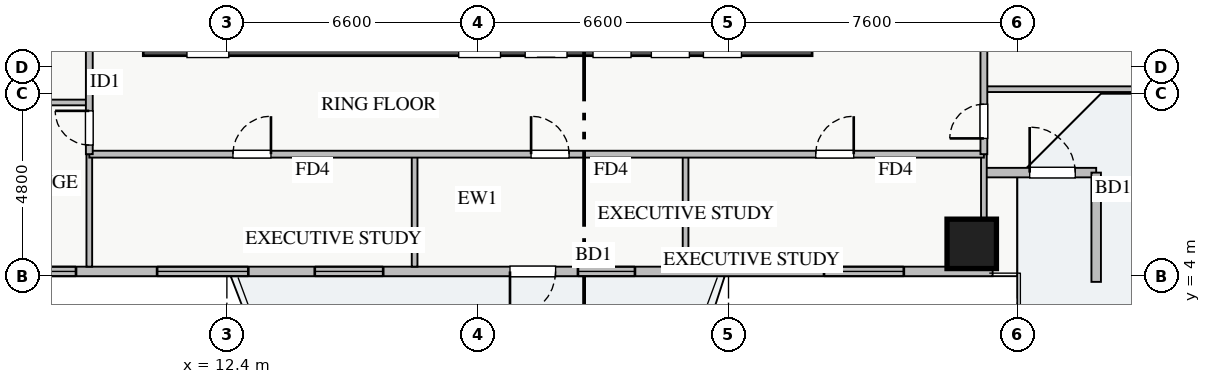
"""IFC4 building model, lengths in metres.
Left out: names, types, materials, properties, quantities, classifications, styles, units other than length and angle.
Written with IfcOpenShell. Run it as: python <this file> out.ifc"""

import sys

from ifc_helpers import new_model, si_unit, direction, frame, frame_2d, origin, origin_2d, place, context, subcontext, project, spatial, rectangle, extrude, source, transform, mapped, element, fill, save


model = new_model("IFC4")
c1 = context("Model", 3, precision=1e-05, world=origin(), true_north=direction((0.0, 1.0)))
c2 = subcontext(c1, "Body", "Model", "MODEL_VIEW")
j1 = project(units=[si_unit("LENGTHUNIT", "METRE"), si_unit("PLANEANGLEUNIT", "RADIAN")], contexts=[c1])
p1 = place(None, origin())
s1 = spatial("IfcSite", under=j1, at=p1, CompositionType="ELEMENT")
p2 = place(p1, origin())
s2 = spatial("IfcBuilding", under=s1, at=p2, CompositionType="ELEMENT")
p3 = place(p2, frame((0.0, 0.0, 23.0)))
s3 = spatial("IfcBuildingStorey", under=s2, at=p3, CompositionType="ELEMENT", Elevation=23.0)
p4 = place(p3, frame((10.2, 10.2, 0.0), z_axis=(0.0, 0.0, 1.0), x_axis=(1.0, 0.0, 0.0)))
e1 = element("IfcWall", 1, at=p4, inside=s3, PredefinedType="SHEAR", context=c2, shape_type="SweptSolid", body=[
    extrude(rectangle(XDim=17.6, YDim=0.8, at=frame_2d((8.8, 0.0))), origin(), (0.0, 0.0, 1.0), 3.25),
])
p5 = place(p4, frame((1.15, 0.0, 0.0)))
e2 = element("IfcOpeningElement", 2, at=p5, cuts=e1, PredefinedType="OPENING", context=c2, shape_type="SweptSolid", body=[
    extrude(rectangle(XDim=1.1, YDim=2.05, at=frame_2d((0.55, 1.025))), frame((0.0, 0.41, 0.0), z_axis=(0.0, -1.0, 0.0), x_axis=(1.0, 0.0, 0.0)), (0.0, 0.0, 1.0), 0.82),
])
p6 = place(p4, frame((8.3, 0.0, 0.0)))
e3 = element("IfcOpeningElement", 3, at=p6, cuts=e1, PredefinedType="OPENING", context=c2, shape_type="SweptSolid", body=[
    extrude(rectangle(XDim=1.1, YDim=2.05, at=frame_2d((0.55, 1.025))), frame((0.0, 0.41, 0.0), z_axis=(0.0, -1.0, 0.0), x_axis=(1.0, 0.0, 0.0)), (0.0, 0.0, 1.0), 0.82),
])
p7 = place(p4, frame((10.05, 0.0, 0.0)))
e4 = element("IfcOpeningElement", 4, at=p7, cuts=e1, PredefinedType="OPENING", context=c2, shape_type="SweptSolid", body=[
    extrude(rectangle(XDim=1.1, YDim=2.05, at=frame_2d((0.55, 1.025))), frame((0.0, 0.41, 0.0), z_axis=(0.0, -1.0, 0.0), x_axis=(1.0, 0.0, 0.0)), (0.0, 0.0, 1.0), 0.82),
])
p8 = place(p4, frame((14.74, 0.0, 0.0)))
e5 = element("IfcOpeningElement", 5, at=p8, cuts=e1, PredefinedType="OPENING", context=c2, shape_type="SweptSolid", body=[
    extrude(rectangle(XDim=1.0, YDim=2.05, at=frame_2d((0.5, 1.025))), frame((0.0, 0.41, 0.0), z_axis=(0.0, -1.0, 0.0), x_axis=(1.0, 0.0, 0.0)), (0.0, 0.0, 1.0), 0.82),
])
p9 = place(p4, frame((11.835, 0.0, 0.0)))
e6 = element("IfcOpeningElement", 6, at=p9, cuts=e1, PredefinedType="OPENING", context=c2, shape_type="SweptSolid", body=[
    extrude(rectangle(XDim=1.0, YDim=2.05, at=frame_2d((0.5, 1.025))), frame((0.0, 0.41, 0.0), z_axis=(0.0, -1.0, 0.0), x_axis=(1.0, 0.0, 0.0)), (0.0, 0.0, 1.0), 0.82),
])
p10 = place(p4, frame((13.37, 0.0, 0.0)))
e7 = element("IfcOpeningElement", 7, at=p10, cuts=e1, PredefinedType="OPENING", context=c2, shape_type="SweptSolid", body=[
    extrude(rectangle(XDim=1.0, YDim=2.05, at=frame_2d((0.5, 1.025))), frame((0.0, 0.41, 0.0), z_axis=(0.0, -1.0, 0.0), x_axis=(1.0, 0.0, 0.0)), (0.0, 0.0, 1.0), 0.82),
])
m1 = source(origin(), c2, "Body", "SweptSolid", [
    extrude(rectangle(XDim=1.3, YDim=1.3, at=origin_2d()), origin(), (0.0, 0.0, 1.0), 3.25),
])
p11 = place(p3, frame((32.0, 4.85, 0.0), z_axis=(0.0, 0.0, 1.0), x_axis=(1.0, 0.0, 0.0)))
e8 = element("IfcColumn", 8, at=p11, inside=s3, PredefinedType="COLUMN", context=c2, shape_type="MappedRepresentation", body=[
    mapped(m1, transform((0.0, 0.0, 0.0), x_axis=(1.0, 0.0, 0.0), y_axis=(0.0, 1.0, 0.0), z_axis=(0.0, 0.0, 1.0), scale=1.0)),
])
p12 = place(p3, frame((5.45, 4.125, 0.0), z_axis=(0.0, 0.0, 1.0), x_axis=(1.0, 0.0, 0.0)))
e9 = element("IfcWall", 9, at=p12, inside=s3, PredefinedType="STANDARD", context=c2, shape_type="SweptSolid", body=[
    extrude(rectangle(XDim=27.1, YDim=0.25, at=frame_2d((13.55, 0.0))), origin(), (0.0, 0.0, 1.0), 2.61),
])
p13 = place(p12, frame((14.4, 0.0, 0.0)))
e10 = element("IfcOpeningElement", 10, at=p13, cuts=e9, PredefinedType="OPENING", context=c2, shape_type="SweptSolid", body=[
    extrude(rectangle(XDim=1.2, YDim=2.1, at=frame_2d((0.6, 1.05))), frame((0.0, 0.135, 0.0), z_axis=(0.0, -1.0, 0.0), x_axis=(1.0, 0.0, 0.0)), (0.0, 0.0, 1.0), 0.27),
])
p14 = place(p12, frame((1.48, 0.0, 0.9)))
e11 = element("IfcOpeningElement", 11, at=p14, cuts=e9, PredefinedType="OPENING", context=c2, shape_type="SweptSolid", body=[
    extrude(rectangle(XDim=1.5, YDim=1.5, at=frame_2d((0.75, 0.75))), frame((0.0, 0.135, 0.0), z_axis=(0.0, -1.0, 0.0), x_axis=(1.0, 0.0, 0.0)), (0.0, 0.0, 1.0), 0.27),
])
p15 = place(p12, frame((9.263, 0.0, 0.9)))
e12 = element("IfcOpeningElement", 12, at=p15, cuts=e9, PredefinedType="OPENING", context=c2, shape_type="SweptSolid", body=[
    extrude(rectangle(XDim=1.8, YDim=1.45, at=frame_2d((0.9, 0.725))), frame((0.0, 0.135, 0.0), z_axis=(0.0, -1.0, 0.0), x_axis=(1.0, 0.0, 0.0)), (0.0, 0.0, 1.0), 0.27),
])
p16 = place(p12, frame((16.188, 0.0, 0.9)))
e13 = element("IfcOpeningElement", 13, at=p16, cuts=e9, PredefinedType="OPENING", context=c2, shape_type="SweptSolid", body=[
    extrude(rectangle(XDim=1.5, YDim=1.45, at=frame_2d((0.75, 0.725))), frame((0.0, 0.135, 0.0), z_axis=(0.0, -1.0, 0.0), x_axis=(1.0, 0.0, 0.0)), (0.0, 0.0, 1.0), 0.27),
])
p17 = place(p12, frame((22.663, 0.0, 0.9)))
e14 = element("IfcOpeningElement", 14, at=p17, cuts=e9, PredefinedType="OPENING", context=c2, shape_type="SweptSolid", body=[
    extrude(rectangle(XDim=2.1, YDim=1.48, at=frame_2d((1.05, 0.74))), frame((0.0, 0.135, 0.0), z_axis=(0.0, -1.0, 0.0), x_axis=(1.0, 0.0, 0.0)), (0.0, 0.0, 1.0), 0.27),
])
p18 = place(p12, frame((5.114, 0.0, 0.9)))
e15 = element("IfcOpeningElement", 15, at=p18, cuts=e9, PredefinedType="OPENING", context=c2, shape_type="SweptSolid", body=[
    extrude(rectangle(XDim=2.4, YDim=1.5, at=frame_2d((1.2, 0.75))), frame((0.0, 0.135, 0.0), z_axis=(0.0, -1.0, 0.0), x_axis=(1.0, 0.0, 0.0)), (0.0, 0.0, 1.0), 0.27),
])
p19 = place(p3, frame((32.375, 6.725, 0.0), z_axis=(0.0, 0.0, 1.0), x_axis=(1.0, 0.0, 0.0)))
e16 = element("IfcWall", 16, at=p19, inside=s3, PredefinedType="STANDARD", context=c2, shape_type="SweptSolid", body=[
    extrude(rectangle(XDim=2.9, YDim=0.25, at=frame_2d((1.45, 0.0))), origin(), (0.0, 0.0, 1.0), 2.61),
])
p20 = place(p19, frame((1.15, 0.0, 0.0)))
e17 = element("IfcOpeningElement", 17, at=p20, cuts=e16, PredefinedType="OPENING", context=c2, shape_type="SweptSolid", body=[
    extrude(rectangle(XDim=1.2, YDim=2.1, at=frame_2d((0.6, 1.05))), frame((0.0, 0.135, 0.0), z_axis=(0.0, -1.0, 0.0), x_axis=(1.0, 0.0, 0.0)), (0.0, 0.0, 1.0), 0.27),
])
p21 = place(p3, frame((35.275, 3.85, 0.0), z_axis=(0.0, 0.0, 1.0), x_axis=(0.0, 1.0, 0.0)))
e18 = element("IfcWall", 18, at=p21, inside=s3, PredefinedType="STANDARD", context=c2, shape_type="SweptSolid", body=[
    extrude(rectangle(XDim=2.875, YDim=0.25, at=frame_2d((1.438, 0.0))), origin(), (0.0, 0.0, 1.0), 2.61),
])
for number, where, z_axis, x_axis in (
    (19, (17.34, 4.25, 0.0), (0.0, 0.0, 1.0), (0.0, 1.0, 0.0)),
    (20, (24.47, 4.25, 0.0), (0.0, 0.0, 1.0), (0.0, 1.0, 0.0)),
    (21, (8.78, 4.25, 0.0), (0.0, 0.0, 1.0), (0.0, 1.0, 0.0)),
    (22, (32.32, 4.25, 0.0), (0.0, 0.0, 1.0), (0.0, 1.0, 0.0)),
):
    element("IfcWall", number, at=place(p3, frame(where, z_axis=z_axis, x_axis=x_axis)), inside=s3, PredefinedType="PARTITIONING", context=c2, shape_type="SweptSolid", body=[
        extrude(rectangle(XDim=2.96, YDim=0.15, at=frame_2d((1.48, 0.0))), origin(), (0.0, 0.0, 1.0), 3.07),
    ])
p22 = place(p3, frame((8.78, 7.21, 0.0), z_axis=(0.0, 0.0, 1.0), x_axis=(1.0, 0.0, 0.0)))
e23 = element("IfcWall", 23, at=p22, inside=s3, PredefinedType="PARTITIONING", context=c2, shape_type="SweptSolid", body=[
    extrude(rectangle(XDim=23.54, YDim=0.18, at=frame_2d((11.77, 0.0))), origin(), (0.0, 0.0, 1.0), 3.07),
])
p23 = place(p22, frame((3.78, 0.0, 0.0)))
e24 = element("IfcOpeningElement", 24, at=p23, cuts=e23, PredefinedType="OPENING", context=c2, shape_type="SweptSolid", body=[
    extrude(rectangle(XDim=1.0, YDim=2.05, at=frame_2d((0.5, 1.025))), frame((0.0, 0.1, 0.0), z_axis=(0.0, -1.0, 0.0), x_axis=(1.0, 0.0, 0.0)), (0.0, 0.0, 1.0), 0.2),
])
p24 = place(p22, frame((11.625, 0.0, 0.0)))
e25 = element("IfcOpeningElement", 25, at=p24, cuts=e23, PredefinedType="OPENING", context=c2, shape_type="SweptSolid", body=[
    extrude(rectangle(XDim=1.0, YDim=2.05, at=frame_2d((0.5, 1.025))), frame((0.0, 0.1, 0.0), z_axis=(0.0, -1.0, 0.0), x_axis=(1.0, 0.0, 0.0)), (0.0, 0.0, 1.0), 0.2),
])
p25 = place(p22, frame((19.115, 0.0, 0.0)))
e26 = element("IfcOpeningElement", 26, at=p25, cuts=e23, PredefinedType="OPENING", context=c2, shape_type="SweptSolid", body=[
    extrude(rectangle(XDim=1.0, YDim=2.05, at=frame_2d((0.5, 1.025))), frame((0.0, 0.1, 0.0), z_axis=(0.0, -1.0, 0.0), x_axis=(1.0, 0.0, 0.0)), (0.0, 0.0, 1.0), 0.2),
])
p26 = place(p3, frame((0.25, 8.57, 0.0), z_axis=(0.0, 0.0, 1.0), x_axis=(1.0, 0.0, 0.0)))
e27 = element("IfcWall", 27, at=p26, inside=s3, PredefinedType="PARTITIONING", context=c2, shape_type="SweptSolid", body=[
    extrude(rectangle(XDim=8.53, YDim=0.15, at=frame_2d((4.265, 0.0))), origin(), (0.0, 0.0, 1.0), 3.07),
])
p27 = place(p3, frame((8.78, 7.21, 0.0), z_axis=(0.0, 0.0, 1.0), x_axis=(0.0, 1.0, 0.0)))
e28 = element("IfcWall", 28, at=p27, inside=s3, PredefinedType="PARTITIONING", context=c2, shape_type="SweptSolid", body=[
    extrude(rectangle(XDim=31.23, YDim=0.18, at=frame_2d((15.615, 0.0))), origin(), (0.0, 0.0, 1.0), 3.07),
])
p28 = place(p27, frame((30.09, 0.0, 0.0)))
e29 = element("IfcOpeningElement", 29, at=p28, cuts=e28, PredefinedType="OPENING", context=c2, shape_type="SweptSolid", body=[
    extrude(rectangle(XDim=0.9, YDim=2.05, at=frame_2d((0.45, 1.025))), frame((0.0, 0.1, 0.0), z_axis=(0.0, -1.0, 0.0), x_axis=(1.0, 0.0, 0.0)), (0.0, 0.0, 1.0), 0.2),
])
p29 = place(p27, frame((0.24, 0.0, 0.0)))
e30 = element("IfcOpeningElement", 30, at=p29, cuts=e28, PredefinedType="OPENING", context=c2, shape_type="SweptSolid", body=[
    extrude(rectangle(XDim=0.9, YDim=2.05, at=frame_2d((0.45, 1.025))), frame((0.0, 0.1, 0.0), z_axis=(0.0, -1.0, 0.0), x_axis=(1.0, 0.0, 0.0)), (0.0, 0.0, 1.0), 0.2),
])
p30 = place(p27, frame((3.975, 0.0, 0.0)))
e31 = element("IfcOpeningElement", 31, at=p30, cuts=e28, PredefinedType="OPENING", context=c2, shape_type="SweptSolid", body=[
    extrude(rectangle(XDim=1.0, YDim=2.05, at=frame_2d((0.5, 1.025))), frame((0.0, 0.1, 0.0), z_axis=(0.0, -1.0, 0.0), x_axis=(1.0, 0.0, 0.0)), (0.0, 0.0, 1.0), 0.2),
])
p31 = place(p27, frame((22.0, 0.0, 0.0)))
e32 = element("IfcOpeningElement", 32, at=p31, cuts=e28, PredefinedType="OPENING", context=c2, shape_type="SweptSolid", body=[
    extrude(rectangle(XDim=1.0, YDim=2.05, at=frame_2d((0.5, 1.025))), frame((0.0, 0.1, 0.0), z_axis=(0.0, -1.0, 0.0), x_axis=(1.0, 0.0, 0.0)), (0.0, 0.0, 1.0), 0.2),
])
p32 = place(p3, frame((32.32, 8.92, 0.0), z_axis=(0.0, 0.0, 1.0), x_axis=(1.0, 0.0, 0.0)))
e33 = element("IfcWall", 33, at=p32, inside=s3, PredefinedType="PARTITIONING", context=c2, shape_type="SweptSolid", body=[
    extrude(rectangle(XDim=5.43, YDim=0.15, at=frame_2d((2.715, 0.0))), origin(), (0.0, 0.0, 1.0), 3.07),
])
p33 = place(p3, frame((32.32, 7.21, 0.0), z_axis=(0.0, 0.0, 1.0), x_axis=(0.0, 1.0, 0.0)))
e34 = element("IfcWall", 34, at=p33, inside=s3, PredefinedType="PARTITIONING", context=c2, shape_type="SweptSolid", body=[
    extrude(rectangle(XDim=31.23, YDim=0.18, at=frame_2d((15.615, 0.0))), origin(), (0.0, 0.0, 1.0), 2.865),
])
p34 = place(p33, frame((30.09, 0.0, 0.0)))
e35 = element("IfcOpeningElement", 35, at=p34, cuts=e34, PredefinedType="OPENING", context=c2, shape_type="SweptSolid", body=[
    extrude(rectangle(XDim=0.9, YDim=2.05, at=frame_2d((0.45, 1.025))), frame((0.0, 0.1, 0.0), z_axis=(0.0, -1.0, 0.0), x_axis=(1.0, 0.0, 0.0)), (0.0, 0.0, 1.0), 0.2),
])
p35 = place(p33, frame((0.415, 0.0, 0.0)))
e36 = element("IfcOpeningElement", 36, at=p35, cuts=e34, PredefinedType="OPENING", context=c2, shape_type="SweptSolid", body=[
    extrude(rectangle(XDim=0.9, YDim=2.05, at=frame_2d((0.45, 1.025))), frame((0.0, 0.1, 0.0), z_axis=(0.0, -1.0, 0.0), x_axis=(1.0, 0.0, 0.0)), (0.0, 0.0, 1.0), 0.2),
])
p36 = place(p33, frame((8.575, 0.0, 0.0)))
e37 = element("IfcOpeningElement", 37, at=p36, cuts=e34, PredefinedType="OPENING", context=c2, shape_type="SweptSolid", body=[
    extrude(rectangle(XDim=1.0, YDim=2.05, at=frame_2d((0.5, 1.025))), frame((0.0, 0.1, 0.0), z_axis=(0.0, -1.0, 0.0), x_axis=(1.0, 0.0, 0.0)), (0.0, 0.0, 1.0), 0.2),
])
p37 = place(p33, frame((19.375, 0.0, 0.0)))
e38 = element("IfcOpeningElement", 38, at=p37, cuts=e34, PredefinedType="OPENING", context=c2, shape_type="SweptSolid", body=[
    extrude(rectangle(XDim=1.0, YDim=2.05, at=frame_2d((0.5, 1.025))), frame((0.0, 0.1, 0.0), z_axis=(0.0, -1.0, 0.0), x_axis=(1.0, 0.0, 0.0)), (0.0, 0.0, 1.0), 0.2),
])
m2 = source(origin(), c2, "Body", "SweptSolid", [
    extrude(rectangle(XDim=1.2, YDim=2.1, at=frame_2d((0.6, 1.05))), frame((0.0, 0.025, 0.0), z_axis=(0.0, -1.0, 0.0), x_axis=(1.0, 0.0, 0.0)), (0.0, 0.0, 1.0), 0.05),
])
p38 = place(p13, frame((1.2, 0.0, 0.0), z_axis=(0.0, 0.0, 1.0), x_axis=(-1.0, 0.0, 0.0)))
e39 = element("IfcDoor", 39, at=p38, inside=s3, OperationType="SINGLE_SWING_LEFT", PredefinedType="DOOR", context=c2, shape_type="MappedRepresentation", body=[
    mapped(m2, transform((0.0, 0.0, 0.0), x_axis=(1.0, 0.0, 0.0), y_axis=(0.0, 1.0, 0.0), z_axis=(0.0, 0.0, 1.0), scale=1.0)),
])
fill(e10, e39)
m3 = source(origin(), c2, "Body", "SweptSolid", [
    extrude(rectangle(XDim=1.5, YDim=1.5, at=frame_2d((0.75, 0.75))), frame((0.0, 0.03, 0.0), z_axis=(0.0, -1.0, 0.0), x_axis=(1.0, 0.0, 0.0)), (0.0, 0.0, 1.0), 0.06),
])
p39 = place(p14, origin())
e40 = element("IfcWindow", 40, at=p39, inside=s3, PartitioningType="TRIPLE_PANEL_VERTICAL", PredefinedType="WINDOW", context=c2, shape_type="MappedRepresentation", body=[
    mapped(m3, transform((0.0, 0.0, 0.0), x_axis=(1.0, 0.0, 0.0), y_axis=(0.0, 1.0, 0.0), z_axis=(0.0, 0.0, 1.0), scale=1.0)),
])
fill(e11, e40)
m4 = source(origin(), c2, "Body", "SweptSolid", [
    extrude(rectangle(XDim=1.8, YDim=1.45, at=frame_2d((0.9, 0.725))), frame((0.0, 0.03, 0.0), z_axis=(0.0, -1.0, 0.0), x_axis=(1.0, 0.0, 0.0)), (0.0, 0.0, 1.0), 0.06),
])
p40 = place(p15, origin())
e41 = element("IfcWindow", 41, at=p40, inside=s3, PartitioningType="DOUBLE_PANEL_VERTICAL", PredefinedType="WINDOW", context=c2, shape_type="MappedRepresentation", body=[
    mapped(m4, transform((0.0, 0.0, 0.0), x_axis=(1.0, 0.0, 0.0), y_axis=(0.0, 1.0, 0.0), z_axis=(0.0, 0.0, 1.0), scale=1.0)),
])
fill(e12, e41)
m5 = source(origin(), c2, "Body", "SweptSolid", [
    extrude(rectangle(XDim=1.5, YDim=1.45, at=frame_2d((0.75, 0.725))), frame((0.0, 0.03, 0.0), z_axis=(0.0, -1.0, 0.0), x_axis=(1.0, 0.0, 0.0)), (0.0, 0.0, 1.0), 0.06),
])
p41 = place(p16, origin())
e42 = element("IfcWindow", 42, at=p41, inside=s3, PartitioningType="DOUBLE_PANEL_VERTICAL", PredefinedType="WINDOW", context=c2, shape_type="MappedRepresentation", body=[
    mapped(m5, transform((0.0, 0.0, 0.0), x_axis=(1.0, 0.0, 0.0), y_axis=(0.0, 1.0, 0.0), z_axis=(0.0, 0.0, 1.0), scale=1.0)),
])
fill(e13, e42)
m6 = source(origin(), c2, "Body", "SweptSolid", [
    extrude(rectangle(XDim=2.1, YDim=1.48, at=frame_2d((1.05, 0.74))), frame((0.0, 0.03, 0.0), z_axis=(0.0, -1.0, 0.0), x_axis=(1.0, 0.0, 0.0)), (0.0, 0.0, 1.0), 0.06),
])
p42 = place(p17, origin())
e43 = element("IfcWindow", 43, at=p42, inside=s3, PartitioningType="TRIPLE_PANEL_VERTICAL", PredefinedType="WINDOW", context=c2, shape_type="MappedRepresentation", body=[
    mapped(m6, transform((0.0, 0.0, 0.0), x_axis=(1.0, 0.0, 0.0), y_axis=(0.0, 1.0, 0.0), z_axis=(0.0, 0.0, 1.0), scale=1.0)),
])
fill(e14, e43)
p43 = place(p20, origin())
e44 = element("IfcDoor", 44, at=p43, inside=s3, OperationType="SINGLE_SWING_LEFT", PredefinedType="DOOR", context=c2, shape_type="MappedRepresentation", body=[
    mapped(m2, transform((0.0, 0.0, 0.0), x_axis=(1.0, 0.0, 0.0), y_axis=(0.0, 1.0, 0.0), z_axis=(0.0, 0.0, 1.0), scale=1.0)),
])
fill(e17, e44)
m7 = source(origin(), c2, "Body", "SweptSolid", [
    extrude(rectangle(XDim=1.0, YDim=2.05, at=frame_2d((0.5, 1.025))), frame((0.0, 0.025, 0.0), z_axis=(0.0, -1.0, 0.0), x_axis=(1.0, 0.0, 0.0)), (0.0, 0.0, 1.0), 0.05),
])
p44 = place(p23, origin())
e45 = element("IfcDoor", 45, at=p44, inside=s3, OperationType="SINGLE_SWING_RIGHT", PredefinedType="DOOR", context=c2, shape_type="MappedRepresentation", body=[
    mapped(m7, transform((0.0, 0.0, 0.0), x_axis=(1.0, 0.0, 0.0), y_axis=(0.0, 1.0, 0.0), z_axis=(0.0, 0.0, 1.0), scale=1.0)),
])
fill(e24, e45)
p45 = place(p24, origin())
e46 = element("IfcDoor", 46, at=p45, inside=s3, OperationType="SINGLE_SWING_LEFT", PredefinedType="DOOR", context=c2, shape_type="MappedRepresentation", body=[
    mapped(m7, transform((0.0, 0.0, 0.0), x_axis=(1.0, 0.0, 0.0), y_axis=(0.0, 1.0, 0.0), z_axis=(0.0, 0.0, 1.0), scale=1.0)),
])
fill(e25, e46)
p46 = place(p25, origin())
e47 = element("IfcDoor", 47, at=p46, inside=s3, OperationType="SINGLE_SWING_RIGHT", PredefinedType="DOOR", context=c2, shape_type="MappedRepresentation", body=[
    mapped(m7, transform((0.0, 0.0, 0.0), x_axis=(1.0, 0.0, 0.0), y_axis=(0.0, 1.0, 0.0), z_axis=(0.0, 0.0, 1.0), scale=1.0)),
])
fill(e26, e47)
m8 = source(origin(), c2, "Body", "SweptSolid", [
    extrude(rectangle(XDim=0.9, YDim=2.05, at=frame_2d((0.45, 1.025))), frame((0.0, 0.025, 0.0), z_axis=(0.0, -1.0, 0.0), x_axis=(1.0, 0.0, 0.0)), (0.0, 0.0, 1.0), 0.05),
])
p47 = place(p29, origin())
e48 = element("IfcDoor", 48, at=p47, inside=s3, OperationType="SINGLE_SWING_RIGHT", PredefinedType="DOOR", context=c2, shape_type="MappedRepresentation", body=[
    mapped(m8, transform((0.0, 0.0, 0.0), x_axis=(1.0, 0.0, 0.0), y_axis=(0.0, 1.0, 0.0), z_axis=(0.0, 0.0, 1.0), scale=1.0)),
])
fill(e30, e48)
p48 = place(p35, origin())
e49 = element("IfcDoor", 49, at=p48, inside=s3, OperationType="SINGLE_SWING_LEFT", PredefinedType="DOOR", context=c2, shape_type="MappedRepresentation", body=[
    mapped(m8, transform((0.0, 0.0, 0.0), x_axis=(1.0, 0.0, 0.0), y_axis=(0.0, 1.0, 0.0), z_axis=(0.0, 0.0, 1.0), scale=1.0)),
])
fill(e36, e49)
m9 = source(origin(), c2, "Body", "SweptSolid", [
    extrude(rectangle(XDim=2.4, YDim=1.5, at=frame_2d((1.2, 0.75))), frame((0.0, 0.03, 0.0), z_axis=(0.0, -1.0, 0.0), x_axis=(1.0, 0.0, 0.0)), (0.0, 0.0, 1.0), 0.06),
])
p49 = place(p18, origin())
e50 = element("IfcWindow", 50, at=p49, inside=s3, PartitioningType="TRIPLE_PANEL_VERTICAL", PredefinedType="WINDOW", context=c2, shape_type="MappedRepresentation", body=[
    mapped(m9, transform((0.0, 0.0, 0.0), x_axis=(1.0, 0.0, 0.0), y_axis=(0.0, 1.0, 0.0), z_axis=(0.0, 0.0, 1.0), scale=1.0)),
])
fill(e15, e50)
save(model, sys.argv[1])
